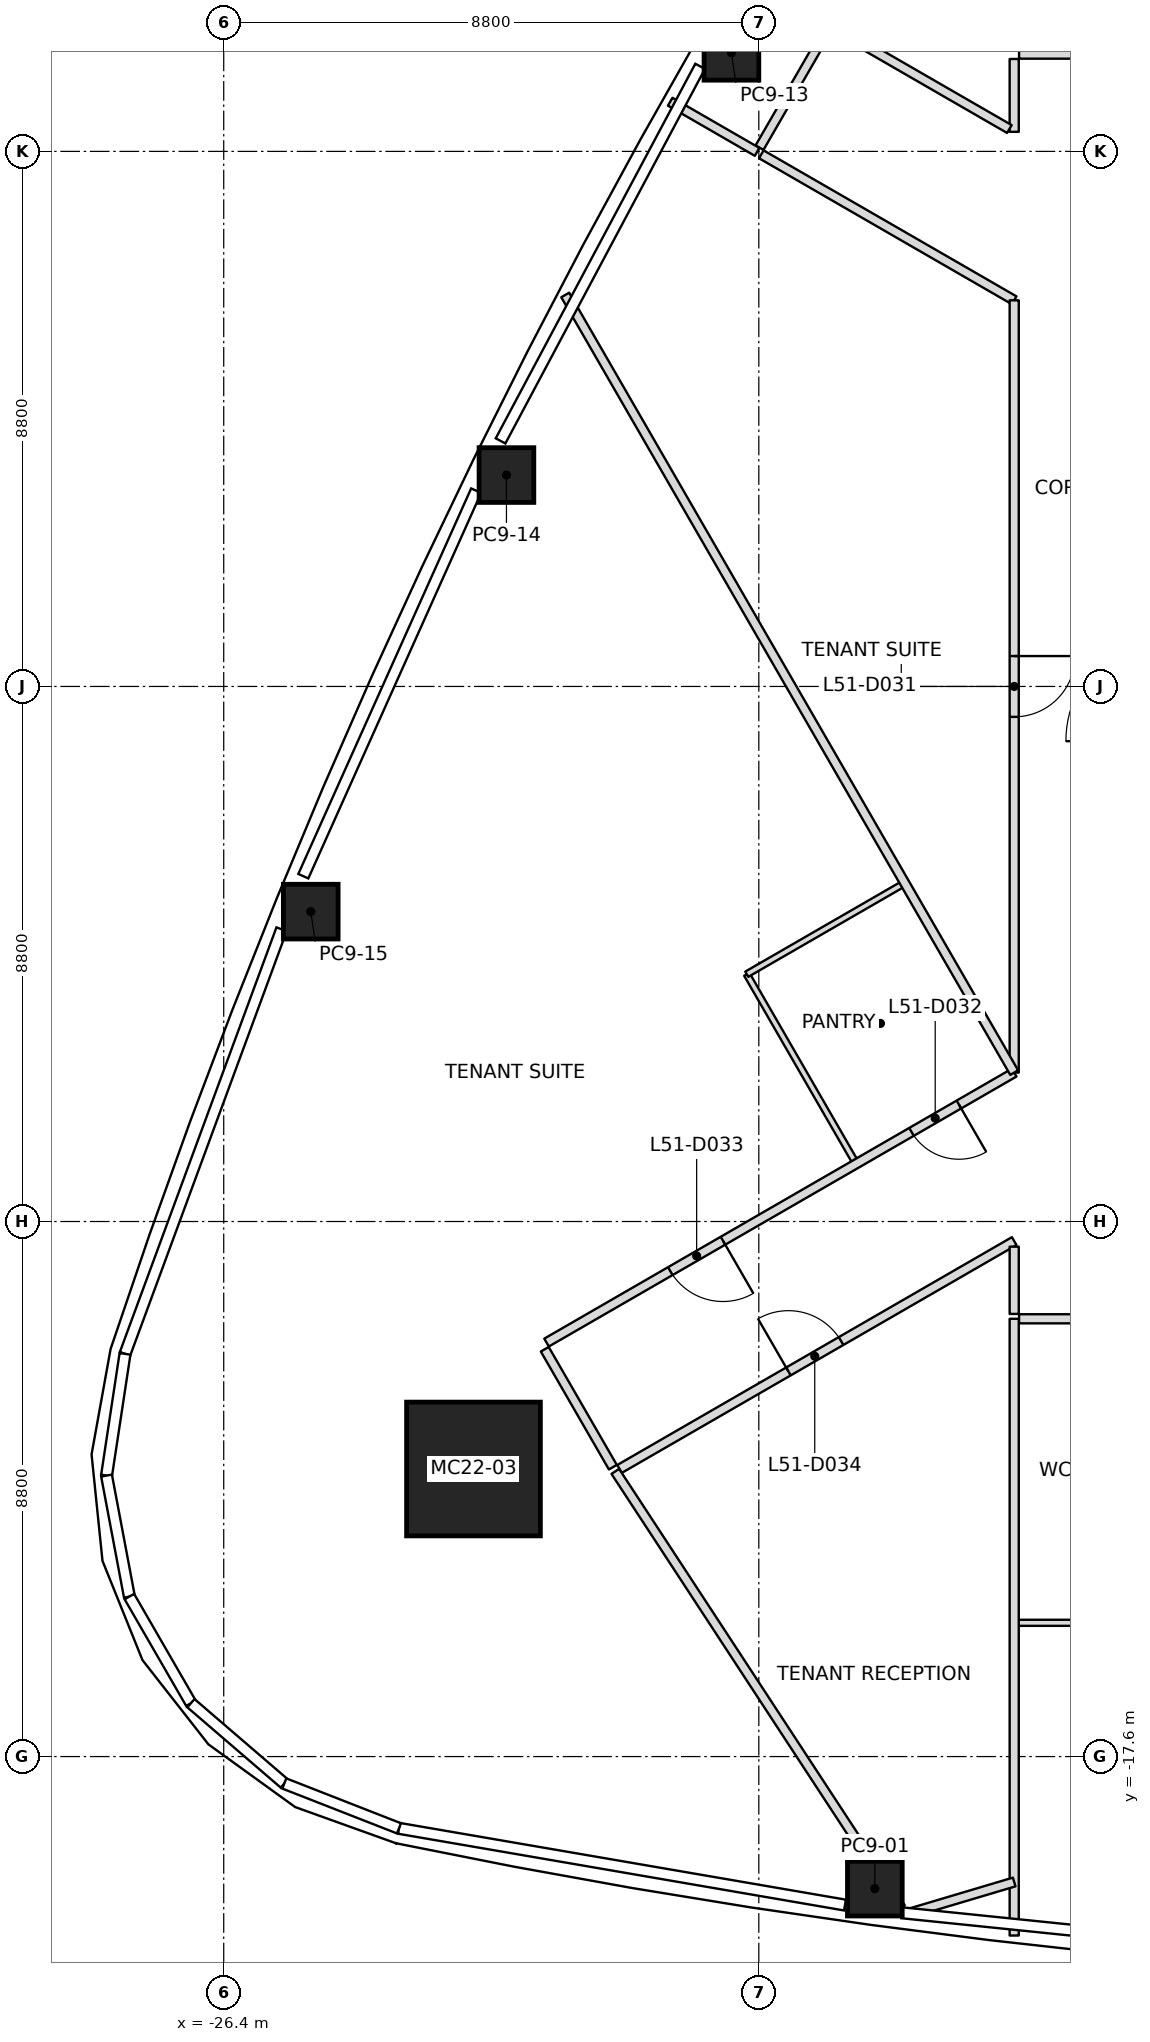
"""IFC4 building model, lengths in metres.
Left out: names, types, materials, properties, quantities, classifications, styles, units other than length and angle.
Written with IfcOpenShell. Run it as: python <this file> out.ifc"""

import sys

from ifc_helpers import new_model, si_unit, direction, frame, frame_2d, origin, origin_2d, place, context, subcontext, project, spatial, rectangle, extrude, element, fill, save


model = new_model("IFC4")
c1 = context("Model", 3, precision=1e-05, world=origin(), true_north=direction((0.0, 1.0)))
c2 = subcontext(c1, "Body", "Model", "MODEL_VIEW")
j1 = project(units=[si_unit("LENGTHUNIT", "METRE"), si_unit("PLANEANGLEUNIT", "RADIAN")], contexts=[c1])
p1 = place(None, origin())
s1 = spatial("IfcSite", under=j1, at=p1, CompositionType="ELEMENT")
p2 = place(p1, origin())
s2 = spatial("IfcBuilding", under=s1, at=p2, CompositionType="ELEMENT")
p3 = place(p2, frame((0.0, 0.0, 231.0)))
s3 = spatial("IfcBuildingStorey", under=s2, at=p3, CompositionType="ELEMENT", Elevation=231.0)
p4 = place(p3, frame((-22.292, -12.871, 0.0), z_axis=(0.027878605886, 0.016104927689, 0.999481572936), x_axis=(0.999611316129, -0.000449157512, -0.02787498742)))
e1 = element("IfcColumn", 1, at=p4, inside=s3, PredefinedType="COLUMN", context=c2, shape_type="SweptSolid", body=[
    extrude(rectangle(XDim=2.2, YDim=2.2, at=origin_2d()), origin(), (0.0, 0.0, 1.0), 4.002),
])
p5 = place(p3, frame((-15.692, -19.772, 0.0), z_axis=(0.017574453011, 0.010434831475, 0.999791104628), x_axis=(-0.990574210989, 0.13604032423, 0.015992582844)))
e2 = element("IfcColumn", 2, at=p5, inside=s3, PredefinedType="COLUMN", context=c2, shape_type="SweptSolid", body=[
    extrude(rectangle(XDim=0.9, YDim=0.9, at=origin_2d()), origin(), (0.0, 0.0, 1.0), 4.001),
])
p6 = place(p3, frame((-18.05, 10.421, 0.0), z_axis=(0.009826027463, -0.005675904062, 0.999935614576), x_axis=(0.499975861713, 0.866039339578, 2.779837e-06)))
e3 = element("IfcColumn", 3, at=p6, inside=s3, PredefinedType="COLUMN", context=c2, shape_type="SweptSolid", body=[
    extrude(rectangle(XDim=0.9, YDim=0.9, at=origin_2d()), origin(), (0.0, 0.0, 1.0), 4.0),
])
p7 = place(p3, frame((-21.75, 3.477, 0.0), z_axis=(0.014097691364, 0.002013955909, 0.999898594398), x_axis=(0.439826491839, 0.898047046282, -0.008009977548)))
e4 = element("IfcColumn", 4, at=p7, inside=s3, PredefinedType="COLUMN", context=c2, shape_type="SweptSolid", body=[
    extrude(rectangle(XDim=0.9, YDim=0.9, at=origin_2d()), origin(), (0.0, 0.0, 1.0), 4.0),
])
p8 = place(p3, frame((-24.969, -3.704, 0.0), z_axis=(0.017818543466, 0.010007675097, 0.999791151165), x_axis=(0.37764023014, 0.925814200458, -0.015997587651)))
e5 = element("IfcColumn", 5, at=p8, inside=s3, PredefinedType="COLUMN", context=c2, shape_type="SweptSolid", body=[
    extrude(rectangle(XDim=0.9, YDim=0.9, at=origin_2d()), origin(), (0.0, 0.0, 1.0), 4.001),
])
p9 = place(p3, frame((-13.4, -6.351, 0.0), z_axis=(0.0, 0.0, 1.0), x_axis=(-0.500006275671, 0.866021780494, 0.0)))
e6 = element("IfcWall", 6, at=p9, inside=s3, PredefinedType="PARTITIONING", context=c2, shape_type="SweptSolid", body=[
    extrude(rectangle(XDim=14.768, YDim=0.15, at=frame_2d((7.384, 0.0))), origin(), (0.0, 0.0, 1.0), 3.234),
])
p10 = place(p3, frame((-19.96, -12.91, 0.0), z_axis=(0.0, 0.0, 1.0), x_axis=(0.547697942309, -0.836676140445, 0.0)))
e7 = element("IfcWall", 7, at=p10, inside=s3, PredefinedType="PARTITIONING", context=c2, shape_type="SweptSolid", body=[
    extrude(rectangle(XDim=8.577, YDim=0.15, at=frame_2d((4.289, 0.0))), origin(), (0.0, 0.0, 1.0), 3.45),
])
p11 = place(p3, frame((-17.628, 8.792, 0.0), z_axis=(0.0, 0.0, 1.0), x_axis=(-0.866040211805, 0.499974350878, 0.0)))
e8 = element("IfcWall", 8, at=p11, inside=s3, PredefinedType="PARTITIONING", context=c2, shape_type="SweptSolid", body=[
    extrude(rectangle(XDim=1.65, YDim=0.15, at=frame_2d((0.825, 0.0))), origin(), (0.0, 0.0, 1.0), 3.234),
])
p12 = place(p3, frame((-13.4, -10.4, 0.0), z_axis=(0.0, 0.0, 1.0), x_axis=(0.0, -1.0, 0.0)))
e9 = element("IfcWall", 9, at=p12, inside=s3, PredefinedType="PARTITIONING", context=c2, shape_type="SweptSolid", body=[
    extrude(rectangle(XDim=10.144, YDim=0.15, at=frame_2d((5.072, 0.0))), origin(), (0.0, 0.0, 1.0), 3.234),
])
p13 = place(p3, frame((-13.4, -19.663, 0.0), z_axis=(0.0, 0.0, 1.0), x_axis=(-0.958455635455, -0.285241642935, 0.0)))
e10 = element("IfcWall", 10, at=p13, inside=s3, PredefinedType="PARTITIONING", context=c2, shape_type="SweptSolid", body=[
    extrude(rectangle(XDim=1.787, YDim=0.15, at=frame_2d((0.894, 0.0))), origin(), (0.0, 0.0, 1.0), 3.234),
])
p14 = place(p3, frame((-21.12, -10.901, 0.0), z_axis=(0.0, 0.0, 1.0), x_axis=(0.49994888933, -0.866054910533, 0.0)))
e11 = element("IfcWall", 11, at=p14, inside=s3, PredefinedType="PARTITIONING", context=c2, shape_type="SweptSolid", body=[
    extrude(rectangle(XDim=2.24, YDim=0.15, at=frame_2d((1.12, 0.0))), origin(), (0.0, 0.0, 1.0), 3.233),
])
p15 = place(p3, frame((-13.4, -6.351, 0.0), z_axis=(0.0, 0.0, 1.0), x_axis=(-0.866028564552, -0.499994525349, 0.0)))
e12 = element("IfcWall", 12, at=p15, inside=s3, PredefinedType="PARTITIONING", context=c2, shape_type="SweptSolid", body=[
    extrude(rectangle(XDim=8.881, YDim=0.15, at=frame_2d((4.44, 0.0))), origin(), (0.0, 0.0, 1.0), 3.317),
])
p16 = place(p15, frame((1.05, 0.0, 0.0)))
e13 = element("IfcOpeningElement", 13, at=p16, cuts=e12, PredefinedType="OPENING", context=c2, shape_type="SweptSolid", body=[
    extrude(rectangle(XDim=0.9, YDim=2.1, at=frame_2d((0.45, 1.05))), frame((0.0, 0.075, 0.0), z_axis=(0.0, -1.0, 0.0), x_axis=(1.0, 0.0, 0.0)), (0.0, 0.0, 1.0), 0.15),
])
p17 = place(p15, frame((5.531, 0.0, 0.0)))
e14 = element("IfcOpeningElement", 14, at=p17, cuts=e12, PredefinedType="OPENING", context=c2, shape_type="SweptSolid", body=[
    extrude(rectangle(XDim=1.0, YDim=2.1, at=frame_2d((0.5, 1.05))), frame((0.0, 0.075, 0.0), z_axis=(0.0, -1.0, 0.0), x_axis=(1.0, 0.0, 0.0)), (0.0, 0.0, 1.0), 0.15),
])
p18 = place(p3, frame((-19.891, -12.87, 0.0), z_axis=(0.0, 0.0, 1.0), x_axis=(0.866019606374, 0.500010041276, 0.0)))
e15 = element("IfcWall", 15, at=p18, inside=s3, PredefinedType="PARTITIONING", context=c2, shape_type="SweptSolid", body=[
    extrude(rectangle(XDim=7.495, YDim=0.15, at=frame_2d((3.748, 0.0))), origin(), (0.0, 0.0, 1.0), 3.233),
])
p19 = place(p18, frame((3.208, 0.0, 0.0)))
e16 = element("IfcOpeningElement", 16, at=p19, cuts=e15, PredefinedType="OPENING", context=c2, shape_type="SweptSolid", body=[
    extrude(rectangle(XDim=1.0, YDim=2.1, at=frame_2d((0.5, 1.05))), frame((0.0, 0.075, 0.0), z_axis=(0.0, -1.0, 0.0), x_axis=(1.0, 0.0, 0.0)), (0.0, 0.0, 1.0), 0.15),
])
p20 = place(p3, frame((-13.4, -9.214, 0.0), z_axis=(0.0, 0.0, 1.0), x_axis=(0.0, -1.0, 0.0)))
e17 = element("IfcWall", 17, at=p20, inside=s3, PredefinedType="PARTITIONING", context=c2, shape_type="SweptSolid", body=[
    extrude(rectangle(XDim=1.106, YDim=0.15, at=frame_2d((0.553, 0.0))), origin(), (0.0, 0.0, 1.0), 3.233),
])
p21 = place(p3, frame((-16.469, 10.802, 0.0), z_axis=(0.0, 0.0, 1.0), x_axis=(-0.49994888933, -0.866054910533, 0.0)))
e18 = element("IfcWall", 18, at=p21, inside=s3, PredefinedType="PARTITIONING", context=c2, shape_type="SweptSolid", body=[
    extrude(rectangle(XDim=2.24, YDim=0.15, at=frame_2d((1.12, 0.0))), origin(), (0.0, 0.0, 1.0), 3.45),
])
p22 = place(p3, frame((-17.559, 8.752, 0.0), z_axis=(0.0, 0.0, 1.0), x_axis=(0.866032371008, -0.49998793222, 0.0)))
e19 = element("IfcWall", 19, at=p22, inside=s3, PredefinedType="PARTITIONING", context=c2, shape_type="SweptSolid", body=[
    extrude(rectangle(XDim=4.803, YDim=0.15, at=frame_2d((2.401, 0.0))), origin(), (0.0, 0.0, 1.0), 3.45),
])
p23 = place(p3, frame((-13.4, 6.351, 0.0), z_axis=(0.0, 0.0, 1.0), x_axis=(0.0, -1.0, 0.0)))
e20 = element("IfcWall", 20, at=p23, inside=s3, PredefinedType="PARTITIONING", context=c2, shape_type="SweptSolid", body=[
    extrude(rectangle(XDim=12.702, YDim=0.15, at=frame_2d((6.351, 0.0))), origin(), (0.0, 0.0, 1.0), 3.317),
])
p24 = place(p23, frame((5.851, 0.0, 0.0)))
e21 = element("IfcOpeningElement", 21, at=p24, cuts=e20, PredefinedType="OPENING", context=c2, shape_type="SweptSolid", body=[
    extrude(rectangle(XDim=1.0, YDim=2.1, at=frame_2d((0.5, 1.05))), frame((0.0, 0.075, 0.0), z_axis=(0.0, -1.0, 0.0), x_axis=(1.0, 0.0, 0.0)), (0.0, 0.0, 1.0), 0.15),
])
p25 = place(p3, frame((-13.4, 10.32, 0.0), z_axis=(0.0, 0.0, 1.0), x_axis=(0.0, -1.0, 0.0)))
e22 = element("IfcWall", 22, at=p25, inside=s3, PredefinedType="PARTITIONING", context=c2, shape_type="SweptSolid", body=[
    extrude(rectangle(XDim=1.198, YDim=0.15, at=frame_2d((0.599, 0.0))), origin(), (0.0, 0.0, 1.0), 3.45),
])
p26 = place(p3, frame((-13.479, 9.168, 0.0), z_axis=(0.0, 0.0, 1.0), x_axis=(-0.866025439566, 0.499999938025, 0.0)))
e23 = element("IfcWall", 23, at=p26, inside=s3, PredefinedType="PARTITIONING", context=c2, shape_type="SweptSolid", body=[
    extrude(rectangle(XDim=3.326, YDim=0.15, at=frame_2d((1.663, 0.0))), origin(), (0.0, 0.0, 1.0), 3.45),
])
p27 = place(p3, frame((-13.32, -10.4, 0.0), z_axis=(0.0, 0.0, 1.0), x_axis=(1.0, 0.0, 0.0)))
e24 = element("IfcWall", 24, at=p27, inside=s3, PredefinedType="PARTITIONING", context=c2, shape_type="SweptSolid", body=[
    extrude(rectangle(XDim=12.12, YDim=0.15, at=frame_2d((6.06, 0.0))), origin(), (0.0, 0.0, 1.0), 3.317),
])
p28 = place(p27, frame((1.57, 0.0, 0.0)))
e25 = element("IfcOpeningElement", 25, at=p28, cuts=e24, PredefinedType="OPENING", context=c2, shape_type="SweptSolid", body=[
    extrude(rectangle(XDim=0.9, YDim=2.1, at=frame_2d((0.45, 1.05))), frame((0.0, 0.075, 0.0), z_axis=(0.0, -1.0, 0.0), x_axis=(1.0, 0.0, 0.0)), (0.0, 0.0, 1.0), 0.15),
])
p29 = place(p27, frame((7.67, 0.0, 0.0)))
e26 = element("IfcOpeningElement", 26, at=p29, cuts=e24, PredefinedType="OPENING", context=c2, shape_type="SweptSolid", body=[
    extrude(rectangle(XDim=1.0, YDim=2.1, at=frame_2d((0.5, 1.05))), frame((0.0, 0.075, 0.0), z_axis=(0.0, -1.0, 0.0), x_axis=(1.0, 0.0, 0.0)), (0.0, 0.0, 1.0), 0.15),
])
p30 = place(p3, frame((-4.98, 10.4, 0.0), z_axis=(0.0, 0.0, 1.0), x_axis=(-1.0, 0.0, 0.0)))
e27 = element("IfcWall", 27, at=p30, inside=s3, PredefinedType="PARTITIONING", context=c2, shape_type="SweptSolid", body=[
    extrude(rectangle(XDim=8.34, YDim=0.15, at=frame_2d((4.17, 0.0))), origin(), (0.0, 0.0, 1.0), 3.317),
])
p31 = place(p30, frame((3.97, 0.0, 0.0)))
e28 = element("IfcOpeningElement", 28, at=p31, cuts=e27, PredefinedType="OPENING", context=c2, shape_type="SweptSolid", body=[
    extrude(rectangle(XDim=1.0, YDim=2.1, at=frame_2d((0.5, 1.05))), frame((0.0, 0.075, 0.0), z_axis=(0.0, -1.0, 0.0), x_axis=(1.0, 0.0, 0.0)), (0.0, 0.0, 1.0), 0.15),
])
p32 = place(p3, frame((-16.013, -7.825, 0.0), z_axis=(0.0, 0.0, 1.0), x_axis=(-0.499971082179, 0.866042098853, 0.0)))
e29 = element("IfcWall", 29, at=p32, inside=s3, PredefinedType="PARTITIONING", context=c2, shape_type="SweptSolid", body=[
    extrude(rectangle(XDim=3.57, YDim=0.1, at=frame_2d((1.785, 0.0))), origin(), (0.0, 0.0, 1.0), 3.317),
])
p33 = place(p3, frame((-17.798, -4.733, 0.0), z_axis=(0.0, 0.0, 1.0), x_axis=(0.866039111053, 0.499976257563, 0.0)))
e30 = element("IfcWall", 30, at=p33, inside=s3, PredefinedType="PARTITIONING", context=c2, shape_type="SweptSolid", body=[
    extrude(rectangle(XDim=2.97, YDim=0.1, at=frame_2d((1.485, 0.0))), origin(), (0.0, 0.0, 1.0), 3.317),
])
p34 = place(p3, frame((-9.2, -15.4, 0.0), z_axis=(0.0, 0.0, 1.0), x_axis=(-1.0, 0.0, 0.0)))
e31 = element("IfcWall", 31, at=p34, inside=s3, PredefinedType="PARTITIONING", context=c2, shape_type="SweptSolid", body=[
    extrude(rectangle(XDim=4.17, YDim=0.1, at=frame_2d((2.085, 0.0))), origin(), (0.0, 0.0, 1.0), 3.393),
])
p35 = place(p24, origin())
e32 = element("IfcDoor", 32, at=p35, inside=s3, OperationType="SINGLE_SWING_LEFT", PredefinedType="DOOR", context=c2, shape_type="SweptSolid", body=[
    extrude(rectangle(XDim=1.0, YDim=2.1, at=frame_2d((0.5, 1.05))), frame((0.0, 0.025, 0.0), z_axis=(0.0, -1.0, 0.0), x_axis=(1.0, 0.0, 0.0)), (0.0, 0.0, 1.0), 0.05),
])
fill(e21, e32)
p36 = place(p16, origin())
e33 = element("IfcDoor", 33, at=p36, inside=s3, OperationType="SINGLE_SWING_RIGHT", PredefinedType="DOOR", context=c2, shape_type="SweptSolid", body=[
    extrude(rectangle(XDim=0.9, YDim=2.1, at=frame_2d((0.45, 1.05))), frame((0.0, 0.025, 0.0), z_axis=(0.0, -1.0, 0.0), x_axis=(1.0, 0.0, 0.0)), (0.0, 0.0, 1.0), 0.05),
])
fill(e13, e33)
p37 = place(p17, origin())
e34 = element("IfcDoor", 34, at=p37, inside=s3, OperationType="SINGLE_SWING_RIGHT", PredefinedType="DOOR", context=c2, shape_type="SweptSolid", body=[
    extrude(rectangle(XDim=1.0, YDim=2.1, at=frame_2d((0.5, 1.05))), frame((0.0, 0.025, 0.0), z_axis=(0.0, -1.0, 0.0), x_axis=(1.0, 0.0, 0.0)), (0.0, 0.0, 1.0), 0.05),
])
fill(e14, e34)
p38 = place(p19, origin())
e35 = element("IfcDoor", 35, at=p38, inside=s3, OperationType="SINGLE_SWING_LEFT", PredefinedType="DOOR", context=c2, shape_type="SweptSolid", body=[
    extrude(rectangle(XDim=1.0, YDim=2.1, at=frame_2d((0.5, 1.05))), frame((0.0, 0.025, 0.0), z_axis=(0.0, -1.0, 0.0), x_axis=(1.0, 0.0, 0.0)), (0.0, 0.0, 1.0), 0.05),
])
fill(e16, e35)
save(model, sys.argv[1])
